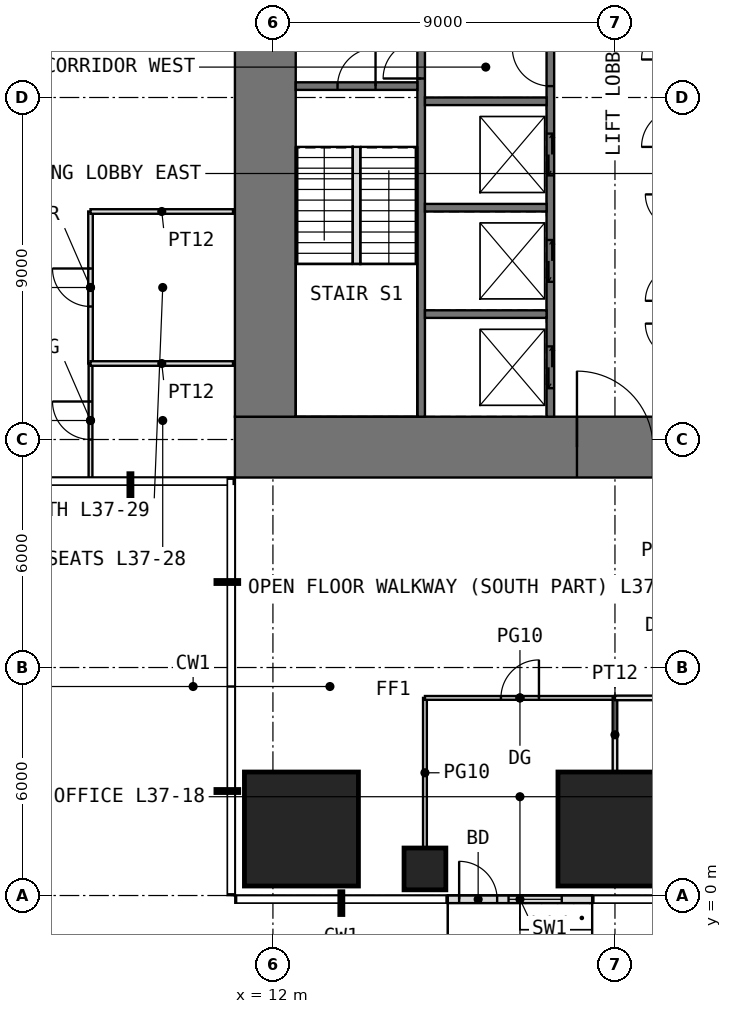
"""IFC4 building model, lengths in metres.
Left out: names, types, materials, properties, quantities, classifications, styles, units other than length and angle.
Written with IfcOpenShell. Run it as: python <this file> out.ifc"""

import sys

from ifc_helpers import new_model, si_unit, direction, frame, frame_2d, origin, origin_2d, place, context, subcontext, project, spatial, rectangle, extrude, element, fill, save


model = new_model("IFC4")
c1 = context("Model", 3, precision=1e-05, world=origin(), true_north=direction((0.0, 1.0)))
c2 = subcontext(c1, "Body", "Model", "MODEL_VIEW")
j1 = project(units=[si_unit("LENGTHUNIT", "METRE"), si_unit("PLANEANGLEUNIT", "RADIAN")], contexts=[c1])
p1 = place(None, origin())
s1 = spatial("IfcSite", under=j1, at=p1, CompositionType="ELEMENT")
p2 = place(p1, origin())
s2 = spatial("IfcBuilding", under=s1, at=p2, CompositionType="ELEMENT")
p3 = place(p2, frame((0.0, 0.0, 156.5)))
s3 = spatial("IfcBuildingStorey", under=s2, at=p3, CompositionType="ELEMENT", Elevation=156.5)
p4 = place(p3, frame((12.75, 1.75, 0.0), z_axis=(0.0, 0.0, 1.0), x_axis=(1.0, 0.0, 0.0)))
e1 = element("IfcColumn", 1, at=p4, inside=s3, PredefinedType="COLUMN", context=c2, shape_type="SweptSolid", body=[
    extrude(rectangle(XDim=3.0, YDim=3.0, at=origin_2d()), origin(), (0.0, 0.0, 1.0), 4.0),
])
p5 = place(p3, frame((16.0, 0.7, 0.0), z_axis=(0.0, 0.0, 1.0), x_axis=(1.0, 0.0, 0.0)))
e2 = element("IfcColumn", 2, at=p5, inside=s3, PredefinedType="COLUMN", context=c2, shape_type="SweptSolid", body=[
    extrude(rectangle(XDim=1.1, YDim=1.1, at=origin_2d()), origin(), (0.0, 0.0, 1.0), 4.0),
])
p6 = place(p3, frame((21.0, 1.75, 0.0), z_axis=(0.0, 0.0, 1.0), x_axis=(1.0, 0.0, 0.0)))
e3 = element("IfcColumn", 3, at=p6, inside=s3, PredefinedType="COLUMN", context=c2, shape_type="SweptSolid", body=[
    extrude(rectangle(XDim=3.0, YDim=3.0, at=origin_2d()), origin(), (0.0, 0.0, 1.0), 4.0),
])
p7 = place(p3, frame((16.6, -0.1, 0.0), z_axis=(0.0, 0.0, 1.0), x_axis=(1.0, 0.0, 0.0)))
e4 = element("IfcWall", 4, at=p7, inside=s3, PredefinedType="USERDEFINED", context=c2, shape_type="SweptSolid", body=[
    extrude(rectangle(XDim=3.8, YDim=0.2, at=frame_2d((1.9, 0.0))), origin(), (0.0, 0.0, 1.0), 3.55),
])
p8 = place(p7, frame((0.3, 0.0, 0.0)))
e5 = element("IfcOpeningElement", 5, at=p8, cuts=e4, PredefinedType="OPENING", context=c2, shape_type="SweptSolid", body=[
    extrude(rectangle(XDim=1.0, YDim=2.4, at=frame_2d((0.5, 1.2))), frame((0.0, 0.11, 0.0), z_axis=(0.0, -1.0, 0.0), x_axis=(1.0, 0.0, 0.0)), (0.0, 0.0, 1.0), 0.22),
])
p9 = place(p7, frame((1.6, 0.0, 0.3)))
e6 = element("IfcOpeningElement", 6, at=p9, cuts=e4, PredefinedType="OPENING", context=c2, shape_type="SweptSolid", body=[
    extrude(rectangle(XDim=1.4, YDim=2.7, at=frame_2d((0.7, 1.35))), frame((0.0, 0.11, 0.0), z_axis=(0.0, -1.0, 0.0), x_axis=(1.0, 0.0, 0.0)), (0.0, 0.0, 1.0), 0.22),
])
p10 = place(p3, frame((11.0, 11.8, -0.05), z_axis=(0.0, 0.0, 1.0), x_axis=(1.0, 0.0, 0.0)))
e7 = element("IfcWall", 7, at=p10, inside=s3, PredefinedType="SHEAR", context=c2, shape_type="SweptSolid", body=[
    extrude(rectangle(XDim=20.0, YDim=1.6, at=frame_2d((10.0, 0.0))), origin(), (0.0, 0.0, 1.0), 3.8),
])
p11 = place(p10, frame((9.0, 0.0, 0.05)))
e8 = element("IfcOpeningElement", 8, at=p11, cuts=e7, PredefinedType="OPENING", context=c2, shape_type="SweptSolid", body=[
    extrude(rectangle(XDim=2.0, YDim=2.2, at=frame_2d((1.0, 1.1))), frame((0.0, 0.81, 0.0), z_axis=(0.0, -1.0, 0.0), x_axis=(1.0, 0.0, 0.0)), (0.0, 0.0, 1.0), 1.62),
])
p12 = place(p3, frame((11.8, 12.6, -0.05), z_axis=(0.0, 0.0, 1.0), x_axis=(0.0, 1.0, 0.0)))
e9 = element("IfcWall", 9, at=p12, inside=s3, PredefinedType="SHEAR", context=c2, shape_type="SweptSolid", body=[
    extrude(rectangle(XDim=16.8, YDim=1.6, at=frame_2d((8.4, 0.0))), origin(), (0.0, 0.0, 1.0), 3.8),
])
p13 = place(p12, frame((9.9, 0.0, 0.05)))
e10 = element("IfcOpeningElement", 10, at=p13, cuts=e9, PredefinedType="OPENING", context=c2, shape_type="SweptSolid", body=[
    extrude(rectangle(XDim=1.0, YDim=2.2, at=frame_2d((0.5, 1.1))), frame((0.0, 0.81, 0.0), z_axis=(0.0, -1.0, 0.0), x_axis=(1.0, 0.0, 0.0)), (0.0, 0.0, 1.0), 1.62),
])
p14 = place(p3, frame((15.9, 12.6, -0.05), z_axis=(0.0, 0.0, 1.0), x_axis=(0.0, 1.0, 0.0)))
e11 = element("IfcWall", 11, at=p14, inside=s3, PredefinedType="SHEAR", context=c2, shape_type="SweptSolid", body=[
    extrude(rectangle(XDim=16.8, YDim=0.2, at=frame_2d((8.4, 0.0))), origin(), (0.0, 0.0, 1.0), 3.8),
])
p15 = place(p14, frame((8.9, 0.0, 0.05)))
e12 = element("IfcOpeningElement", 12, at=p15, cuts=e11, PredefinedType="OPENING", context=c2, shape_type="SweptSolid", body=[
    extrude(rectangle(XDim=1.0, YDim=2.2, at=frame_2d((0.5, 1.1))), frame((0.0, 0.11, 0.0), z_axis=(0.0, -1.0, 0.0), x_axis=(1.0, 0.0, 0.0)), (0.0, 0.0, 1.0), 0.22),
])
p16 = place(p3, frame((19.3, 12.6, -0.05), z_axis=(0.0, 0.0, 1.0), x_axis=(0.0, 1.0, 0.0)))
e13 = element("IfcWall", 13, at=p16, inside=s3, PredefinedType="SHEAR", context=c2, shape_type="SweptSolid", body=[
    extrude(rectangle(XDim=16.8, YDim=0.2, at=frame_2d((8.4, 0.0))), origin(), (0.0, 0.0, 1.0), 3.8),
])
p17 = place(p16, frame((8.7, 0.0, 0.05)))
e14 = element("IfcOpeningElement", 14, at=p17, cuts=e13, PredefinedType="OPENING", context=c2, shape_type="SweptSolid", body=[
    extrude(rectangle(XDim=1.0, YDim=2.2, at=frame_2d((0.5, 1.1))), frame((0.0, 0.11, 0.0), z_axis=(0.0, -1.0, 0.0), x_axis=(1.0, 0.0, 0.0)), (0.0, 0.0, 1.0), 0.22),
])
p18 = place(p16, frame((10.85, 0.0, 0.05)))
e15 = element("IfcOpeningElement", 15, at=p18, cuts=e13, PredefinedType="OPENING", context=c2, shape_type="SweptSolid", body=[
    extrude(rectangle(XDim=0.9, YDim=2.2, at=frame_2d((0.45, 1.1))), frame((0.0, 0.11, 0.0), z_axis=(0.0, -1.0, 0.0), x_axis=(1.0, 0.0, 0.0)), (0.0, 0.0, 1.0), 0.22),
])
p19 = place(p16, frame((13.3, 0.0, 0.05)))
e16 = element("IfcOpeningElement", 16, at=p19, cuts=e13, PredefinedType="OPENING", context=c2, shape_type="SweptSolid", body=[
    extrude(rectangle(XDim=1.0, YDim=2.2, at=frame_2d((0.5, 1.1))), frame((0.0, 0.11, 0.0), z_axis=(0.0, -1.0, 0.0), x_axis=(1.0, 0.0, 0.0)), (0.0, 0.0, 1.0), 0.22),
])
p20 = place(p16, frame((15.55, 0.0, 0.05)))
e17 = element("IfcOpeningElement", 17, at=p20, cuts=e13, PredefinedType="OPENING", context=c2, shape_type="SweptSolid", body=[
    extrude(rectangle(XDim=0.9, YDim=2.2, at=frame_2d((0.45, 1.1))), frame((0.0, 0.11, 0.0), z_axis=(0.0, -1.0, 0.0), x_axis=(1.0, 0.0, 0.0)), (0.0, 0.0, 1.0), 0.22),
])
p21 = place(p16, frame((0.75, 0.0, 0.05)))
e18 = element("IfcOpeningElement", 18, at=p21, cuts=e13, PredefinedType="OPENING", context=c2, shape_type="SweptSolid", body=[
    extrude(rectangle(XDim=1.1, YDim=2.2, at=frame_2d((0.55, 1.1))), frame((0.0, 0.11, 0.0), z_axis=(0.0, -1.0, 0.0), x_axis=(1.0, 0.0, 0.0)), (0.0, 0.0, 1.0), 0.22),
])
p22 = place(p16, frame((3.55, 0.0, 0.05)))
e19 = element("IfcOpeningElement", 19, at=p22, cuts=e13, PredefinedType="OPENING", context=c2, shape_type="SweptSolid", body=[
    extrude(rectangle(XDim=1.1, YDim=2.2, at=frame_2d((0.55, 1.1))), frame((0.0, 0.11, 0.0), z_axis=(0.0, -1.0, 0.0), x_axis=(1.0, 0.0, 0.0)), (0.0, 0.0, 1.0), 0.22),
])
p23 = place(p16, frame((6.35, 0.0, 0.05)))
e20 = element("IfcOpeningElement", 20, at=p23, cuts=e13, PredefinedType="OPENING", context=c2, shape_type="SweptSolid", body=[
    extrude(rectangle(XDim=1.1, YDim=2.2, at=frame_2d((0.55, 1.1))), frame((0.0, 0.11, 0.0), z_axis=(0.0, -1.0, 0.0), x_axis=(1.0, 0.0, 0.0)), (0.0, 0.0, 1.0), 0.22),
])
p24 = place(p3, frame((12.6, 21.3, -0.05), z_axis=(0.0, 0.0, 1.0), x_axis=(1.0, 0.0, 0.0)))
e21 = element("IfcWall", 21, at=p24, inside=s3, PredefinedType="SHEAR", context=c2, shape_type="SweptSolid", body=[
    extrude(rectangle(XDim=3.2, YDim=0.2, at=frame_2d((1.6, 0.0))), origin(), (0.0, 0.0, 1.0), 3.8),
])
p25 = place(p24, frame((1.1, 0.0, 0.05)))
e22 = element("IfcOpeningElement", 22, at=p25, cuts=e21, PredefinedType="OPENING", context=c2, shape_type="SweptSolid", body=[
    extrude(rectangle(XDim=1.0, YDim=2.2, at=frame_2d((0.5, 1.1))), frame((0.0, 0.11, 0.0), z_axis=(0.0, -1.0, 0.0), x_axis=(1.0, 0.0, 0.0)), (0.0, 0.0, 1.0), 0.22),
])
for number, where, z_axis, x_axis in (
    (23, (16.0, 15.3, -0.05), (0.0, 0.0, 1.0), (1.0, 0.0, 0.0)),
    (24, (16.0, 18.1, -0.05), (0.0, 0.0, 1.0), (1.0, 0.0, 0.0)),
    (25, (16.0, 20.9, -0.05), (0.0, 0.0, 1.0), (1.0, 0.0, 0.0)),
):
    element("IfcWall", number, at=place(p3, frame(where, z_axis=z_axis, x_axis=x_axis)), inside=s3, PredefinedType="SHEAR", context=c2, shape_type="SweptSolid", body=[
        extrude(rectangle(XDim=3.2, YDim=0.2, at=frame_2d((1.6, 0.0))), origin(), (0.0, 0.0, 1.0), 3.8),
    ])
p26 = place(p3, frame((7.2, 11.0, 0.0), z_axis=(0.0, 0.0, 1.0), x_axis=(0.0, 1.0, 0.0)))
e26 = element("IfcWall", 26, at=p26, inside=s3, PredefinedType="PARTITIONING", context=c2, shape_type="SweptSolid", body=[
    extrude(rectangle(XDim=3.0, YDim=0.1, at=frame_2d((1.5, 0.0))), origin(), (0.0, 0.0, 1.0), 3.55),
])
p27 = place(p26, frame((1.0, 0.0, 0.0)))
e27 = element("IfcOpeningElement", 27, at=p27, cuts=e26, PredefinedType="OPENING", context=c2, shape_type="SweptSolid", body=[
    extrude(rectangle(XDim=1.0, YDim=2.4, at=frame_2d((0.5, 1.2))), frame((0.0, 0.06, 0.0), z_axis=(0.0, -1.0, 0.0), x_axis=(1.0, 0.0, 0.0)), (0.0, 0.0, 1.0), 0.12),
])
p28 = place(p3, frame((7.2, 14.0, 0.0), z_axis=(0.0, 0.0, 1.0), x_axis=(0.0, 1.0, 0.0)))
e28 = element("IfcWall", 28, at=p28, inside=s3, PredefinedType="PARTITIONING", context=c2, shape_type="SweptSolid", body=[
    extrude(rectangle(XDim=4.0, YDim=0.12, at=frame_2d((2.0, 0.0))), origin(), (0.0, 0.0, 1.0), 3.55),
])
p29 = place(p28, frame((1.5, 0.0, 0.0)))
e29 = element("IfcOpeningElement", 29, at=p29, cuts=e28, PredefinedType="OPENING", context=c2, shape_type="SweptSolid", body=[
    extrude(rectangle(XDim=1.0, YDim=2.2, at=frame_2d((0.5, 1.1))), frame((0.0, 0.07, 0.0), z_axis=(0.0, -1.0, 0.0), x_axis=(1.0, 0.0, 0.0)), (0.0, 0.0, 1.0), 0.14),
])
for number, where, z_axis, x_axis in (
    (30, (7.2, 14.0, 0.0), (0.0, 0.0, 1.0), (1.0, 0.0, 0.0)),
    (31, (7.2, 18.0, 0.0), (0.0, 0.0, 1.0), (1.0, 0.0, 0.0)),
):
    element("IfcWall", number, at=place(p3, frame(where, z_axis=z_axis, x_axis=x_axis)), inside=s3, PredefinedType="PARTITIONING", context=c2, shape_type="SweptSolid", body=[
        extrude(rectangle(XDim=3.75, YDim=0.12, at=frame_2d((1.875, 0.0))), origin(), (0.0, 0.0, 1.0), 3.55),
    ])
p30 = place(p3, frame((16.0, 1.26, 0.0), z_axis=(0.0, 0.0, 1.0), x_axis=(0.0, 1.0, 0.0)))
e32 = element("IfcWall", 32, at=p30, inside=s3, PredefinedType="PARTITIONING", context=c2, shape_type="SweptSolid", body=[
    extrude(rectangle(XDim=3.94, YDim=0.1, at=frame_2d((1.97, 0.0))), origin(), (0.0, 0.0, 1.0), 2.736),
])
p31 = place(p3, frame((16.0, 5.2, 0.0), z_axis=(0.0, 0.0, 1.0), x_axis=(1.0, 0.0, 0.0)))
e33 = element("IfcWall", 33, at=p31, inside=s3, PredefinedType="PARTITIONING", context=c2, shape_type="SweptSolid", body=[
    extrude(rectangle(XDim=5.0, YDim=0.1, at=frame_2d((2.5, 0.0))), origin(), (0.0, 0.0, 1.0), 3.55),
])
p32 = place(p31, frame((2.0, 0.0, 0.0)))
e34 = element("IfcOpeningElement", 34, at=p32, cuts=e33, PredefinedType="OPENING", context=c2, shape_type="SweptSolid", body=[
    extrude(rectangle(XDim=1.0, YDim=2.4, at=frame_2d((0.5, 1.2))), frame((0.0, 0.06, 0.0), z_axis=(0.0, -1.0, 0.0), x_axis=(1.0, 0.0, 0.0)), (0.0, 0.0, 1.0), 0.12),
])
p33 = place(p3, frame((21.0, 3.26, 0.0), z_axis=(0.0, 0.0, 1.0), x_axis=(0.0, 1.0, 0.0)))
e35 = element("IfcWall", 35, at=p33, inside=s3, PredefinedType="PARTITIONING", context=c2, shape_type="SweptSolid", body=[
    extrude(rectangle(XDim=1.94, YDim=0.12, at=frame_2d((0.97, 0.0))), origin(), (0.0, 0.0, 1.0), 3.55),
])
p34 = place(p3, frame((21.0, 5.2, 0.0), z_axis=(0.0, 0.0, 1.0), x_axis=(1.0, 0.0, 0.0)))
e36 = element("IfcWall", 36, at=p34, inside=s3, PredefinedType="PARTITIONING", context=c2, shape_type="SweptSolid", body=[
    extrude(rectangle(XDim=5.0, YDim=0.12, at=frame_2d((2.5, 0.0))), origin(), (0.0, 0.0, 1.0), 3.55),
])
p35 = place(p34, frame((1.7, 0.0, 0.0)))
e37 = element("IfcOpeningElement", 37, at=p35, cuts=e36, PredefinedType="OPENING", context=c2, shape_type="SweptSolid", body=[
    extrude(rectangle(XDim=1.0, YDim=2.2, at=frame_2d((0.5, 1.1))), frame((0.0, 0.07, 0.0), z_axis=(0.0, -1.0, 0.0), x_axis=(1.0, 0.0, 0.0)), (0.0, 0.0, 1.0), 0.14),
])
p36 = place(p3, frame((14.2, 16.62, 0.0), z_axis=(0.0, 0.0, 1.0), x_axis=(0.0, 1.0, 0.0)))
e38 = element("IfcWall", 38, at=p36, inside=s3, PredefinedType="PARTITIONING", context=c2, shape_type="SweptSolid", body=[
    extrude(rectangle(XDim=3.08, YDim=0.2, at=frame_2d((1.54, 0.0))), origin(), (0.0, 0.0, 1.0), 4.0),
])
p37 = place(p8, origin())
e39 = element("IfcDoor", 39, at=p37, inside=s3, OperationType="SINGLE_SWING_LEFT", PredefinedType="DOOR", context=c2, shape_type="SweptSolid", body=[
    extrude(rectangle(XDim=1.0, YDim=2.4, at=frame_2d((0.5, 1.2))), frame((0.0, 0.025, 0.0), z_axis=(0.0, -1.0, 0.0), x_axis=(1.0, 0.0, 0.0)), (0.0, 0.0, 1.0), 0.05),
])
fill(e5, e39)
p38 = place(p9, origin())
e40 = element("IfcWindow", 40, at=p38, inside=s3, PartitioningType="SINGLE_PANEL", PredefinedType="WINDOW", context=c2, shape_type="SweptSolid", body=[
    extrude(rectangle(XDim=1.4, YDim=2.7, at=frame_2d((0.7, 1.35))), frame((0.0, 0.03, 0.0), z_axis=(0.0, -1.0, 0.0), x_axis=(1.0, 0.0, 0.0)), (0.0, 0.0, 1.0), 0.06),
])
fill(e6, e40)
p39 = place(p11, origin())
e41 = element("IfcDoor", 41, at=p39, inside=s3, OperationType="DOUBLE_DOOR_SINGLE_SWING", PredefinedType="DOOR", context=c2, shape_type="SweptSolid", body=[
    extrude(rectangle(XDim=2.0, YDim=2.2, at=frame_2d((1.0, 1.1))), frame((0.0, 0.025, 0.0), z_axis=(0.0, -1.0, 0.0), x_axis=(1.0, 0.0, 0.0)), (0.0, 0.0, 1.0), 0.05),
])
fill(e8, e41)
p40 = place(p25, origin())
e42 = element("IfcDoor", 42, at=p40, inside=s3, OperationType="SINGLE_SWING_RIGHT", PredefinedType="DOOR", context=c2, shape_type="SweptSolid", body=[
    extrude(rectangle(XDim=1.0, YDim=2.2, at=frame_2d((0.5, 1.1))), frame((0.0, 0.025, 0.0), z_axis=(0.0, -1.0, 0.0), x_axis=(1.0, 0.0, 0.0)), (0.0, 0.0, 1.0), 0.05),
])
fill(e22, e42)
p41 = place(p15, origin())
e43 = element("IfcDoor", 43, at=p41, inside=s3, OperationType="SINGLE_SWING_LEFT", PredefinedType="DOOR", context=c2, shape_type="SweptSolid", body=[
    extrude(rectangle(XDim=1.0, YDim=2.2, at=frame_2d((0.5, 1.1))), frame((0.0, 0.025, 0.0), z_axis=(0.0, -1.0, 0.0), x_axis=(1.0, 0.0, 0.0)), (0.0, 0.0, 1.0), 0.05),
])
fill(e12, e43)
p42 = place(p17, origin())
e44 = element("IfcDoor", 44, at=p42, inside=s3, OperationType="SINGLE_SWING_RIGHT", PredefinedType="DOOR", context=c2, shape_type="SweptSolid", body=[
    extrude(rectangle(XDim=1.0, YDim=2.2, at=frame_2d((0.5, 1.1))), frame((0.0, 0.025, 0.0), z_axis=(0.0, -1.0, 0.0), x_axis=(1.0, 0.0, 0.0)), (0.0, 0.0, 1.0), 0.05),
])
fill(e14, e44)
p43 = place(p32, origin())
e45 = element("IfcDoor", 45, at=p43, inside=s3, OperationType="SINGLE_SWING_RIGHT", PredefinedType="DOOR", context=c2, shape_type="SweptSolid", body=[
    extrude(rectangle(XDim=1.0, YDim=2.4, at=frame_2d((0.5, 1.2))), frame((0.0, 0.025, 0.0), z_axis=(0.0, -1.0, 0.0), x_axis=(1.0, 0.0, 0.0)), (0.0, 0.0, 1.0), 0.05),
])
fill(e34, e45)
p44 = place(p27, origin())
e46 = element("IfcDoor", 46, at=p44, inside=s3, OperationType="SINGLE_SWING_RIGHT", PredefinedType="DOOR", context=c2, shape_type="SweptSolid", body=[
    extrude(rectangle(XDim=1.0, YDim=2.4, at=frame_2d((0.5, 1.2))), frame((0.0, 0.025, 0.0), z_axis=(0.0, -1.0, 0.0), x_axis=(1.0, 0.0, 0.0)), (0.0, 0.0, 1.0), 0.05),
])
fill(e27, e46)
p45 = place(p29, origin())
e47 = element("IfcDoor", 47, at=p45, inside=s3, OperationType="SINGLE_SWING_RIGHT", PredefinedType="DOOR", context=c2, shape_type="SweptSolid", body=[
    extrude(rectangle(XDim=1.0, YDim=2.2, at=frame_2d((0.5, 1.1))), frame((0.0, 0.025, 0.0), z_axis=(0.0, -1.0, 0.0), x_axis=(1.0, 0.0, 0.0)), (0.0, 0.0, 1.0), 0.05),
])
fill(e29, e47)
p46 = place(p21, origin())
e48 = element("IfcDoor", 48, at=p46, inside=s3, OperationType="DOUBLE_DOOR_SLIDING", PredefinedType="DOOR", context=c2, shape_type="SweptSolid", body=[
    extrude(rectangle(XDim=1.1, YDim=2.2, at=frame_2d((0.55, 1.1))), frame((0.0, 0.025, 0.0), z_axis=(0.0, -1.0, 0.0), x_axis=(1.0, 0.0, 0.0)), (0.0, 0.0, 1.0), 0.05),
])
fill(e18, e48)
p47 = place(p22, origin())
e49 = element("IfcDoor", 49, at=p47, inside=s3, OperationType="DOUBLE_DOOR_SLIDING", PredefinedType="DOOR", context=c2, shape_type="SweptSolid", body=[
    extrude(rectangle(XDim=1.1, YDim=2.2, at=frame_2d((0.55, 1.1))), frame((0.0, 0.025, 0.0), z_axis=(0.0, -1.0, 0.0), x_axis=(1.0, 0.0, 0.0)), (0.0, 0.0, 1.0), 0.05),
])
fill(e19, e49)
p48 = place(p23, origin())
e50 = element("IfcDoor", 50, at=p48, inside=s3, OperationType="DOUBLE_DOOR_SLIDING", PredefinedType="DOOR", context=c2, shape_type="SweptSolid", body=[
    extrude(rectangle(XDim=1.1, YDim=2.2, at=frame_2d((0.55, 1.1))), frame((0.0, 0.025, 0.0), z_axis=(0.0, -1.0, 0.0), x_axis=(1.0, 0.0, 0.0)), (0.0, 0.0, 1.0), 0.05),
])
fill(e20, e50)
save(model, sys.argv[1])
